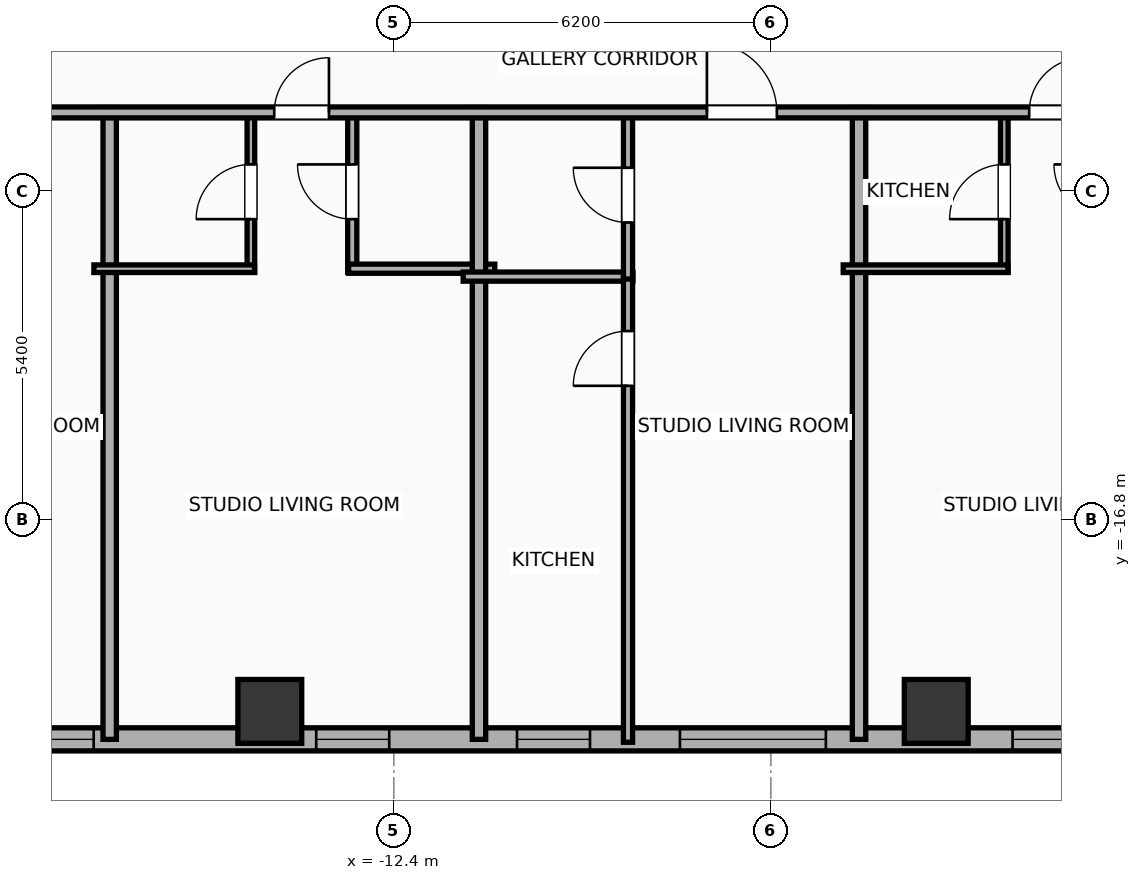
"""IFC4 building model, lengths in metres.
Left out: names, types, materials, properties, quantities, classifications, styles, units other than length and angle.
Written with IfcOpenShell. Run it as: python <this file> out.ifc"""

import sys

from ifc_helpers import new_model, si_unit, direction, frame, frame_2d, origin, origin_2d, place, context, subcontext, project, spatial, rectangle, hollow_rectangle, extrude, element, fill, save


model = new_model("IFC4")
c1 = context("Model", 3, precision=1e-05, world=origin(), true_north=direction((0.0, 1.0)))
c2 = subcontext(c1, "Body", "Model", "MODEL_VIEW")
j1 = project(units=[si_unit("LENGTHUNIT", "METRE"), si_unit("PLANEANGLEUNIT", "RADIAN")], contexts=[c1])
p1 = place(None, origin())
s1 = spatial("IfcSite", under=j1, at=p1, CompositionType="ELEMENT")
p2 = place(p1, origin())
s2 = spatial("IfcBuilding", under=s1, at=p2, CompositionType="ELEMENT")
p3 = place(p2, frame((0.0, 0.0, 124.8)))
s3 = spatial("IfcBuildingStorey", under=s2, at=p3, CompositionType="ELEMENT", Elevation=124.8)
for number, where, z_axis, x_axis in (
    (1, (-14.44, -19.95, 0.0), (0.0, 0.0, 1.0), (1.0, 0.0, 0.0)),
    (2, (-3.48, -19.95, 0.0), (0.0, 0.0, 1.0), (1.0, 0.0, 0.0)),
):
    element("IfcColumn", number, at=place(p3, frame(where, z_axis=z_axis, x_axis=x_axis)), inside=s3, PredefinedType="COLUMN", context=c2, shape_type="SweptSolid", body=[
        extrude(hollow_rectangle(XDim=1.05, YDim=1.05, WallThickness=0.036, at=origin_2d()), origin(), (0.0, 0.0, 1.0), 3.9),
    ])
p4 = place(p3, frame((29.381, -20.41, 0.0), z_axis=(0.0, 0.0, 1.0), x_axis=(-1.0, 0.0, 0.0)))
e3 = element("IfcWall", 3, at=p4, inside=s3, PredefinedType="ELEMENTEDWALL", context=c2, shape_type="SweptSolid", body=[
    extrude(rectangle(XDim=54.763, YDim=0.38, at=frame_2d((27.381, 0.0))), origin(), (0.0, 0.0, 1.0), 3.65),
])
p5 = place(p4, frame((5.645, 0.0, 0.75)))
e4 = element("IfcOpeningElement", 4, at=p5, cuts=e3, PredefinedType="OPENING", context=c2, shape_type="SweptSolid", body=[
    extrude(rectangle(XDim=2.4, YDim=2.1, at=frame_2d((1.2, 1.05))), frame((0.0, 0.2, 0.0), z_axis=(0.0, -1.0, 0.0), x_axis=(1.0, 0.0, 0.0)), (0.0, 0.0, 1.0), 0.4),
])
p6 = place(p4, frame((18.486, 0.0, 0.75)))
e5 = element("IfcOpeningElement", 5, at=p6, cuts=e3, PredefinedType="OPENING", context=c2, shape_type="SweptSolid", body=[
    extrude(rectangle(XDim=2.4, YDim=2.1, at=frame_2d((1.2, 1.05))), frame((0.0, 0.2, 0.0), z_axis=(0.0, -1.0, 0.0), x_axis=(1.0, 0.0, 0.0)), (0.0, 0.0, 1.0), 0.4),
])
p7 = place(p4, frame((34.677, 0.0, 0.75)))
e6 = element("IfcOpeningElement", 6, at=p7, cuts=e3, PredefinedType="OPENING", context=c2, shape_type="SweptSolid", body=[
    extrude(rectangle(XDim=2.4, YDim=2.1, at=frame_2d((1.2, 1.05))), frame((0.0, 0.2, 0.0), z_axis=(0.0, -1.0, 0.0), x_axis=(1.0, 0.0, 0.0)), (0.0, 0.0, 1.0), 0.4),
])
p8 = place(p4, frame((46.717, 0.0, 0.75)))
e7 = element("IfcOpeningElement", 7, at=p8, cuts=e3, PredefinedType="OPENING", context=c2, shape_type="SweptSolid", body=[
    extrude(rectangle(XDim=2.4, YDim=2.1, at=frame_2d((1.2, 1.05))), frame((0.0, 0.2, 0.0), z_axis=(0.0, -1.0, 0.0), x_axis=(1.0, 0.0, 0.0)), (0.0, 0.0, 1.0), 0.4),
])
p9 = place(p4, frame((52.719, 0.0, 0.75)))
e8 = element("IfcOpeningElement", 8, at=p9, cuts=e3, PredefinedType="OPENING", context=c2, shape_type="SweptSolid", body=[
    extrude(rectangle(XDim=1.2, YDim=2.05, at=frame_2d((0.6, 1.025))), frame((0.0, 0.2, 0.0), z_axis=(0.0, -1.0, 0.0), x_axis=(1.0, 0.0, 0.0)), (0.0, 0.0, 1.0), 0.4),
])
p10 = place(p4, frame((50.786, 0.0, 0.75)))
e9 = element("IfcOpeningElement", 9, at=p10, cuts=e3, PredefinedType="OPENING", context=c2, shape_type="SweptSolid", body=[
    extrude(rectangle(XDim=1.2, YDim=2.05, at=frame_2d((0.6, 1.025))), frame((0.0, 0.2, 0.0), z_axis=(0.0, -1.0, 0.0), x_axis=(1.0, 0.0, 0.0)), (0.0, 0.0, 1.0), 0.4),
])
p11 = place(p4, frame((41.858, 0.0, 0.75)))
e10 = element("IfcOpeningElement", 10, at=p11, cuts=e3, PredefinedType="OPENING", context=c2, shape_type="SweptSolid", body=[
    extrude(rectangle(XDim=1.2, YDim=2.05, at=frame_2d((0.6, 1.025))), frame((0.0, 0.2, 0.0), z_axis=(0.0, -1.0, 0.0), x_axis=(1.0, 0.0, 0.0)), (0.0, 0.0, 1.0), 0.4),
])
p12 = place(p4, frame((38.556, 0.0, 0.75)))
e11 = element("IfcOpeningElement", 11, at=p12, cuts=e3, PredefinedType="OPENING", context=c2, shape_type="SweptSolid", body=[
    extrude(rectangle(XDim=1.2, YDim=2.05, at=frame_2d((0.6, 1.025))), frame((0.0, 0.2, 0.0), z_axis=(0.0, -1.0, 0.0), x_axis=(1.0, 0.0, 0.0)), (0.0, 0.0, 1.0), 0.4),
])
p13 = place(p4, frame((30.406, 0.0, 0.75)))
e12 = element("IfcOpeningElement", 12, at=p13, cuts=e3, PredefinedType="OPENING", context=c2, shape_type="SweptSolid", body=[
    extrude(rectangle(XDim=1.2, YDim=2.05, at=frame_2d((0.6, 1.025))), frame((0.0, 0.2, 0.0), z_axis=(0.0, -1.0, 0.0), x_axis=(1.0, 0.0, 0.0)), (0.0, 0.0, 1.0), 0.4),
])
p14 = place(p4, frame((25.434, 0.0, 0.75)))
e13 = element("IfcOpeningElement", 13, at=p14, cuts=e3, PredefinedType="OPENING", context=c2, shape_type="SweptSolid", body=[
    extrude(rectangle(XDim=1.2, YDim=2.05, at=frame_2d((0.6, 1.025))), frame((0.0, 0.2, 0.0), z_axis=(0.0, -1.0, 0.0), x_axis=(1.0, 0.0, 0.0)), (0.0, 0.0, 1.0), 0.4),
])
p15 = place(p4, frame((22.669, 0.0, 0.75)))
e14 = element("IfcOpeningElement", 14, at=p15, cuts=e3, PredefinedType="OPENING", context=c2, shape_type="SweptSolid", body=[
    extrude(rectangle(XDim=1.2, YDim=2.05, at=frame_2d((0.6, 1.025))), frame((0.0, 0.2, 0.0), z_axis=(0.0, -1.0, 0.0), x_axis=(1.0, 0.0, 0.0)), (0.0, 0.0, 1.0), 0.4),
])
p16 = place(p4, frame((15.954, 0.0, 0.75)))
e15 = element("IfcOpeningElement", 15, at=p16, cuts=e3, PredefinedType="OPENING", context=c2, shape_type="SweptSolid", body=[
    extrude(rectangle(XDim=1.2, YDim=2.05, at=frame_2d((0.6, 1.025))), frame((0.0, 0.2, 0.0), z_axis=(0.0, -1.0, 0.0), x_axis=(1.0, 0.0, 0.0)), (0.0, 0.0, 1.0), 0.4),
])
p17 = place(p4, frame((11.698, 0.0, 0.75)))
e16 = element("IfcOpeningElement", 16, at=p17, cuts=e3, PredefinedType="OPENING", context=c2, shape_type="SweptSolid", body=[
    extrude(rectangle(XDim=1.2, YDim=2.05, at=frame_2d((0.6, 1.025))), frame((0.0, 0.2, 0.0), z_axis=(0.0, -1.0, 0.0), x_axis=(1.0, 0.0, 0.0)), (0.0, 0.0, 1.0), 0.4),
])
p18 = place(p4, frame((3.225, 0.0, 0.75)))
e17 = element("IfcOpeningElement", 17, at=p18, cuts=e3, PredefinedType="OPENING", context=c2, shape_type="SweptSolid", body=[
    extrude(rectangle(XDim=1.2, YDim=2.05, at=frame_2d((0.6, 1.025))), frame((0.0, 0.2, 0.0), z_axis=(0.0, -1.0, 0.0), x_axis=(1.0, 0.0, 0.0)), (0.0, 0.0, 1.0), 0.4),
])
p19 = place(p4, frame((1.13, 0.0, 0.75)))
e18 = element("IfcOpeningElement", 18, at=p19, cuts=e3, PredefinedType="OPENING", context=c2, shape_type="SweptSolid", body=[
    extrude(rectangle(XDim=1.2, YDim=2.05, at=frame_2d((0.6, 1.025))), frame((0.0, 0.2, 0.0), z_axis=(0.0, -1.0, 0.0), x_axis=(1.0, 0.0, 0.0)), (0.0, 0.0, 1.0), 0.4),
])
p20 = place(p3, frame((-17.073, -20.41, 0.0), z_axis=(0.0, 0.0, 1.0), x_axis=(0.0, 1.0, 0.0)))
e19 = element("IfcWall", 19, at=p20, inside=s3, PredefinedType="PARTITIONING", context=c2, shape_type="SweptSolid", body=[
    extrude(rectangle(XDim=10.39, YDim=0.22, at=frame_2d((5.195, 0.0))), origin(), (0.0, 0.0, 1.0), 3.65),
])
p21 = place(p3, frame((-14.751, -12.73, 0.0), z_axis=(0.0, 0.0, 1.0), x_axis=(0.0, 1.0, 0.0)))
e20 = element("IfcWall", 20, at=p21, inside=s3, PredefinedType="PARTITIONING", context=c2, shape_type="SweptSolid", body=[
    extrude(rectangle(XDim=2.65, YDim=0.125, at=frame_2d((1.325, 0.0))), origin(), (0.0, 0.0, 1.0), 3.65),
])
p22 = place(p21, frame((0.875, 0.0, 0.0)))
e21 = element("IfcOpeningElement", 21, at=p22, cuts=e20, PredefinedType="OPENING", context=c2, shape_type="SweptSolid", body=[
    extrude(rectangle(XDim=0.9, YDim=2.05, at=frame_2d((0.45, 1.025))), frame((0.0, 0.073, 0.0), z_axis=(0.0, -1.0, 0.0), x_axis=(1.0, 0.0, 0.0)), (0.0, 0.0, 1.0), 0.145),
])
p23 = place(p3, frame((-13.084, -12.73, 0.0), z_axis=(0.0, 0.0, 1.0), x_axis=(0.0, 1.0, 0.0)))
e22 = element("IfcWall", 22, at=p23, inside=s3, PredefinedType="PLUMBINGWALL", context=c2, shape_type="SweptSolid", body=[
    extrude(rectangle(XDim=2.65, YDim=0.15, at=frame_2d((1.325, 0.0))), origin(), (0.0, 0.0, 1.0), 3.65),
])
p24 = place(p23, frame((0.875, 0.0, 0.0)))
e23 = element("IfcOpeningElement", 23, at=p24, cuts=e22, PredefinedType="OPENING", context=c2, shape_type="SweptSolid", body=[
    extrude(rectangle(XDim=0.9, YDim=2.05, at=frame_2d((0.45, 1.025))), frame((0.0, 0.085, 0.0), z_axis=(0.0, -1.0, 0.0), x_axis=(1.0, 0.0, 0.0)), (0.0, 0.0, 1.0), 0.17),
])
p25 = place(p3, frame((-17.333, -12.67, 0.0), z_axis=(0.0, 0.0, 1.0), x_axis=(1.0, 0.0, 0.0)))
e24 = element("IfcWall", 24, at=p25, inside=s3, PredefinedType="PARTITIONING", context=c2, shape_type="SweptSolid", body=[
    extrude(rectangle(XDim=2.642, YDim=0.125, at=frame_2d((1.321, 0.0))), origin(), (0.0, 0.0, 1.0), 3.65),
])
p26 = place(p3, frame((-13.144, -12.67, 0.0), z_axis=(0.0, 0.0, 1.0), x_axis=(1.0, 0.0, 0.0)))
e25 = element("IfcWall", 25, at=p26, inside=s3, PredefinedType="PLUMBINGWALL", context=c2, shape_type="SweptSolid", body=[
    extrude(rectangle(XDim=2.404, YDim=0.15, at=frame_2d((1.202, 0.0))), origin(), (0.0, 0.0, 1.0), 3.65),
])
p27 = place(p3, frame((-11.0, -20.41, 0.0), z_axis=(0.0, 0.0, 1.0), x_axis=(0.0, 1.0, 0.0)))
e26 = element("IfcWall", 26, at=p27, inside=s3, PredefinedType="PARTITIONING", context=c2, shape_type="SweptSolid", body=[
    extrude(rectangle(XDim=10.39, YDim=0.22, at=frame_2d((5.195, 0.0))), origin(), (0.0, 0.0, 1.0), 3.65),
])
p28 = place(p3, frame((-11.26, -12.8, 0.0), z_axis=(0.0, 0.0, 1.0), x_axis=(1.0, 0.0, 0.0)))
e27 = element("IfcWall", 27, at=p28, inside=s3, PredefinedType="PLUMBINGWALL", context=c2, shape_type="SweptSolid", body=[
    extrude(rectangle(XDim=2.791, YDim=0.15, at=frame_2d((1.396, 0.0))), origin(), (0.0, 0.0, 1.0), 3.65),
])
p29 = place(p3, frame((-8.549, -20.458, 0.0), z_axis=(0.0, 0.0, 1.0), x_axis=(0.0, 1.0, 0.0)))
e28 = element("IfcWall", 28, at=p29, inside=s3, PredefinedType="PLUMBINGWALL", context=c2, shape_type="SweptSolid", body=[
    extrude(rectangle(XDim=7.698, YDim=0.15, at=frame_2d((3.849, 0.0))), origin(), (0.0, 0.0, 1.0), 3.65),
])
p30 = place(p29, frame((5.862, 0.0, 0.0)))
e29 = element("IfcOpeningElement", 29, at=p30, cuts=e28, PredefinedType="OPENING", context=c2, shape_type="SweptSolid", body=[
    extrude(rectangle(XDim=0.9, YDim=2.05, at=frame_2d((0.45, 1.025))), frame((0.0, 0.085, 0.0), z_axis=(0.0, -1.0, 0.0), x_axis=(1.0, 0.0, 0.0)), (0.0, 0.0, 1.0), 0.17),
])
p31 = place(p3, frame((-8.549, -12.84, 0.0), z_axis=(0.0, 0.0, 1.0), x_axis=(0.0, 1.0, 0.0)))
e30 = element("IfcWall", 30, at=p31, inside=s3, PredefinedType="PLUMBINGWALL", context=c2, shape_type="SweptSolid", body=[
    extrude(rectangle(XDim=2.76, YDim=0.15, at=frame_2d((1.38, 0.0))), origin(), (0.0, 0.0, 1.0), 3.65),
])
p32 = place(p31, frame((0.93, 0.0, 0.0)))
e31 = element("IfcOpeningElement", 31, at=p32, cuts=e30, PredefinedType="OPENING", context=c2, shape_type="SweptSolid", body=[
    extrude(rectangle(XDim=0.9, YDim=2.05, at=frame_2d((0.45, 1.025))), frame((0.0, 0.085, 0.0), z_axis=(0.0, -1.0, 0.0), x_axis=(1.0, 0.0, 0.0)), (0.0, 0.0, 1.0), 0.17),
])
p33 = place(p3, frame((-4.75, -20.41, 0.0), z_axis=(0.0, 0.0, 1.0), x_axis=(0.0, 1.0, 0.0)))
e32 = element("IfcWall", 32, at=p33, inside=s3, PredefinedType="PARTITIONING", context=c2, shape_type="SweptSolid", body=[
    extrude(rectangle(XDim=10.39, YDim=0.22, at=frame_2d((5.195, 0.0))), origin(), (0.0, 0.0, 1.0), 3.65),
])
p34 = place(p3, frame((-2.361, -12.73, 0.0), z_axis=(0.0, 0.0, 1.0), x_axis=(0.0, 1.0, 0.0)))
e33 = element("IfcWall", 33, at=p34, inside=s3, PredefinedType="PARTITIONING", context=c2, shape_type="SweptSolid", body=[
    extrude(rectangle(XDim=2.65, YDim=0.125, at=frame_2d((1.325, 0.0))), origin(), (0.0, 0.0, 1.0), 3.65),
])
p35 = place(p34, frame((0.875, 0.0, 0.0)))
e34 = element("IfcOpeningElement", 34, at=p35, cuts=e33, PredefinedType="OPENING", context=c2, shape_type="SweptSolid", body=[
    extrude(rectangle(XDim=0.9, YDim=2.05, at=frame_2d((0.45, 1.025))), frame((0.0, 0.073, 0.0), z_axis=(0.0, -1.0, 0.0), x_axis=(1.0, 0.0, 0.0)), (0.0, 0.0, 1.0), 0.145),
])
p36 = place(p3, frame((-5.01, -12.67, 0.0), z_axis=(0.0, 0.0, 1.0), x_axis=(1.0, 0.0, 0.0)))
e35 = element("IfcWall", 35, at=p36, inside=s3, PredefinedType="PARTITIONING", context=c2, shape_type="SweptSolid", body=[
    extrude(rectangle(XDim=2.709, YDim=0.125, at=frame_2d((1.354, 0.0))), origin(), (0.0, 0.0, 1.0), 3.65),
])
p37 = place(p3, frame((-29.21, -10.1, 0.0), z_axis=(0.0, 0.0, 1.0), x_axis=(1.0, 0.0, 0.0)))
e36 = element("IfcWall", 36, at=p37, inside=s3, PredefinedType="PARTITIONING", context=c2, shape_type="SweptSolid", body=[
    extrude(rectangle(XDim=62.42, YDim=0.18, at=frame_2d((31.21, 0.0))), origin(), (0.0, 0.0, 1.0), 3.65),
])
p38 = place(p37, frame((2.671, 0.0, 0.0)))
e37 = element("IfcOpeningElement", 37, at=p38, cuts=e36, PredefinedType="OPENING", context=c2, shape_type="SweptSolid", body=[
    extrude(rectangle(XDim=0.9, YDim=2.05, at=frame_2d((0.45, 1.025))), frame((0.0, 0.1, 0.0), z_axis=(0.0, -1.0, 0.0), x_axis=(1.0, 0.0, 0.0)), (0.0, 0.0, 1.0), 0.2),
])
p39 = place(p37, frame((9.637, 0.0, 0.0)))
e38 = element("IfcOpeningElement", 38, at=p39, cuts=e36, PredefinedType="OPENING", context=c2, shape_type="SweptSolid", body=[
    extrude(rectangle(XDim=1.15, YDim=2.05, at=frame_2d((0.575, 1.025))), frame((0.0, 0.1, 0.0), z_axis=(0.0, -1.0, 0.0), x_axis=(1.0, 0.0, 0.0)), (0.0, 0.0, 1.0), 0.2),
])
p40 = place(p37, frame((14.843, 0.0, 0.0)))
e39 = element("IfcOpeningElement", 39, at=p40, cuts=e36, PredefinedType="OPENING", context=c2, shape_type="SweptSolid", body=[
    extrude(rectangle(XDim=0.9, YDim=2.05, at=frame_2d((0.45, 1.025))), frame((0.0, 0.1, 0.0), z_axis=(0.0, -1.0, 0.0), x_axis=(1.0, 0.0, 0.0)), (0.0, 0.0, 1.0), 0.2),
])
p41 = place(p37, frame((21.958, 0.0, 0.0)))
e40 = element("IfcOpeningElement", 40, at=p41, cuts=e36, PredefinedType="OPENING", context=c2, shape_type="SweptSolid", body=[
    extrude(rectangle(XDim=1.15, YDim=2.05, at=frame_2d((0.575, 1.025))), frame((0.0, 0.1, 0.0), z_axis=(0.0, -1.0, 0.0), x_axis=(1.0, 0.0, 0.0)), (0.0, 0.0, 1.0), 0.2),
])
p42 = place(p37, frame((27.258, 0.0, 0.0)))
e41 = element("IfcOpeningElement", 41, at=p42, cuts=e36, PredefinedType="OPENING", context=c2, shape_type="SweptSolid", body=[
    extrude(rectangle(XDim=0.9, YDim=2.05, at=frame_2d((0.45, 1.025))), frame((0.0, 0.1, 0.0), z_axis=(0.0, -1.0, 0.0), x_axis=(1.0, 0.0, 0.0)), (0.0, 0.0, 1.0), 0.2),
])
p43 = place(p37, frame((32.014, 0.0, 0.0)))
e42 = element("IfcOpeningElement", 42, at=p43, cuts=e36, PredefinedType="OPENING", context=c2, shape_type="SweptSolid", body=[
    extrude(rectangle(XDim=1.15, YDim=2.05, at=frame_2d((0.575, 1.025))), frame((0.0, 0.1, 0.0), z_axis=(0.0, -1.0, 0.0), x_axis=(1.0, 0.0, 0.0)), (0.0, 0.0, 1.0), 0.2),
])
p44 = place(p37, frame((38.369, 0.0, 0.0)))
e43 = element("IfcOpeningElement", 43, at=p44, cuts=e36, PredefinedType="OPENING", context=c2, shape_type="SweptSolid", body=[
    extrude(rectangle(XDim=1.15, YDim=2.05, at=frame_2d((0.575, 1.025))), frame((0.0, 0.1, 0.0), z_axis=(0.0, -1.0, 0.0), x_axis=(1.0, 0.0, 0.0)), (0.0, 0.0, 1.0), 0.2),
])
p45 = place(p37, frame((46.09, 0.0, 0.0)))
e44 = element("IfcOpeningElement", 44, at=p45, cuts=e36, PredefinedType="OPENING", context=c2, shape_type="SweptSolid", body=[
    extrude(rectangle(XDim=0.9, YDim=2.05, at=frame_2d((0.45, 1.025))), frame((0.0, 0.1, 0.0), z_axis=(0.0, -1.0, 0.0), x_axis=(1.0, 0.0, 0.0)), (0.0, 0.0, 1.0), 0.2),
])
p46 = place(p37, frame((51.015, 0.0, 0.0)))
e45 = element("IfcOpeningElement", 45, at=p46, cuts=e36, PredefinedType="OPENING", context=c2, shape_type="SweptSolid", body=[
    extrude(rectangle(XDim=1.15, YDim=2.05, at=frame_2d((0.575, 1.025))), frame((0.0, 0.1, 0.0), z_axis=(0.0, -1.0, 0.0), x_axis=(1.0, 0.0, 0.0)), (0.0, 0.0, 1.0), 0.2),
])
p47 = place(p37, frame((58.93, 0.0, 0.0)))
e46 = element("IfcOpeningElement", 46, at=p47, cuts=e36, PredefinedType="OPENING", context=c2, shape_type="SweptSolid", body=[
    extrude(rectangle(XDim=0.9, YDim=2.05, at=frame_2d((0.45, 1.025))), frame((0.0, 0.1, 0.0), z_axis=(0.0, -1.0, 0.0), x_axis=(1.0, 0.0, 0.0)), (0.0, 0.0, 1.0), 0.2),
])
p48 = place(p7, origin())
e47 = element("IfcWindow", 47, at=p48, inside=s3, PartitioningType="SINGLE_PANEL", PredefinedType="WINDOW", context=c2, shape_type="SweptSolid", body=[
    extrude(rectangle(XDim=2.4, YDim=2.1, at=frame_2d((1.2, 1.05))), frame((0.0, 0.03, 0.0), z_axis=(0.0, -1.0, 0.0), x_axis=(1.0, 0.0, 0.0)), (0.0, 0.0, 1.0), 0.06),
])
fill(e6, e47)
p49 = place(p8, origin())
e48 = element("IfcWindow", 48, at=p49, inside=s3, PartitioningType="SINGLE_PANEL", PredefinedType="WINDOW", context=c2, shape_type="SweptSolid", body=[
    extrude(rectangle(XDim=2.4, YDim=2.1, at=frame_2d((1.2, 1.05))), frame((0.0, 0.03, 0.0), z_axis=(0.0, -1.0, 0.0), x_axis=(1.0, 0.0, 0.0)), (0.0, 0.0, 1.0), 0.06),
])
fill(e7, e48)
p50 = place(p11, origin())
e49 = element("IfcWindow", 49, at=p50, inside=s3, PartitioningType="SINGLE_PANEL", PredefinedType="WINDOW", context=c2, shape_type="SweptSolid", body=[
    extrude(rectangle(XDim=1.2, YDim=2.05, at=frame_2d((0.6, 1.025))), frame((0.0, 0.03, 0.0), z_axis=(0.0, -1.0, 0.0), x_axis=(1.0, 0.0, 0.0)), (0.0, 0.0, 1.0), 0.06),
])
fill(e10, e49)
p51 = place(p12, origin())
e50 = element("IfcWindow", 50, at=p51, inside=s3, PartitioningType="SINGLE_PANEL", PredefinedType="WINDOW", context=c2, shape_type="SweptSolid", body=[
    extrude(rectangle(XDim=1.2, YDim=2.05, at=frame_2d((0.6, 1.025))), frame((0.0, 0.03, 0.0), z_axis=(0.0, -1.0, 0.0), x_axis=(1.0, 0.0, 0.0)), (0.0, 0.0, 1.0), 0.06),
])
fill(e11, e50)
p52 = place(p13, origin())
e51 = element("IfcWindow", 51, at=p52, inside=s3, PartitioningType="SINGLE_PANEL", PredefinedType="WINDOW", context=c2, shape_type="SweptSolid", body=[
    extrude(rectangle(XDim=1.2, YDim=2.05, at=frame_2d((0.6, 1.025))), frame((0.0, 0.03, 0.0), z_axis=(0.0, -1.0, 0.0), x_axis=(1.0, 0.0, 0.0)), (0.0, 0.0, 1.0), 0.06),
])
fill(e12, e51)
p53 = place(p22, origin())
e52 = element("IfcDoor", 52, at=p53, inside=s3, OperationType="SINGLE_SWING_LEFT", PredefinedType="DOOR", context=c2, shape_type="SweptSolid", body=[
    extrude(rectangle(XDim=0.9, YDim=2.05, at=frame_2d((0.45, 1.025))), frame((0.0, 0.025, 0.0), z_axis=(0.0, -1.0, 0.0), x_axis=(1.0, 0.0, 0.0)), (0.0, 0.0, 1.0), 0.05),
])
fill(e21, e52)
p54 = place(p24, origin())
e53 = element("IfcDoor", 53, at=p54, inside=s3, OperationType="SINGLE_SWING_RIGHT", PredefinedType="DOOR", context=c2, shape_type="SweptSolid", body=[
    extrude(rectangle(XDim=0.9, YDim=2.05, at=frame_2d((0.45, 1.025))), frame((0.0, 0.025, 0.0), z_axis=(0.0, -1.0, 0.0), x_axis=(1.0, 0.0, 0.0)), (0.0, 0.0, 1.0), 0.05),
])
fill(e23, e53)
p55 = place(p30, origin())
e54 = element("IfcDoor", 54, at=p55, inside=s3, OperationType="SINGLE_SWING_LEFT", PredefinedType="DOOR", context=c2, shape_type="SweptSolid", body=[
    extrude(rectangle(XDim=0.9, YDim=2.05, at=frame_2d((0.45, 1.025))), frame((0.0, 0.025, 0.0), z_axis=(0.0, -1.0, 0.0), x_axis=(1.0, 0.0, 0.0)), (0.0, 0.0, 1.0), 0.05),
])
fill(e29, e54)
p56 = place(p32, origin())
e55 = element("IfcDoor", 55, at=p56, inside=s3, OperationType="SINGLE_SWING_RIGHT", PredefinedType="DOOR", context=c2, shape_type="SweptSolid", body=[
    extrude(rectangle(XDim=0.9, YDim=2.05, at=frame_2d((0.45, 1.025))), frame((0.0, 0.025, 0.0), z_axis=(0.0, -1.0, 0.0), x_axis=(1.0, 0.0, 0.0)), (0.0, 0.0, 1.0), 0.05),
])
fill(e31, e55)
p57 = place(p35, origin())
e56 = element("IfcDoor", 56, at=p57, inside=s3, OperationType="SINGLE_SWING_LEFT", PredefinedType="DOOR", context=c2, shape_type="SweptSolid", body=[
    extrude(rectangle(XDim=0.9, YDim=2.05, at=frame_2d((0.45, 1.025))), frame((0.0, 0.025, 0.0), z_axis=(0.0, -1.0, 0.0), x_axis=(1.0, 0.0, 0.0)), (0.0, 0.0, 1.0), 0.05),
])
fill(e34, e56)
p58 = place(p40, origin())
e57 = element("IfcDoor", 57, at=p58, inside=s3, OperationType="SINGLE_SWING_RIGHT", PredefinedType="DOOR", context=c2, shape_type="SweptSolid", body=[
    extrude(rectangle(XDim=0.9, YDim=2.05, at=frame_2d((0.45, 1.025))), frame((0.0, 0.025, 0.0), z_axis=(0.0, -1.0, 0.0), x_axis=(1.0, 0.0, 0.0)), (0.0, 0.0, 1.0), 0.05),
])
fill(e39, e57)
p59 = place(p41, origin())
e58 = element("IfcDoor", 58, at=p59, inside=s3, OperationType="SINGLE_SWING_LEFT", PredefinedType="DOOR", context=c2, shape_type="SweptSolid", body=[
    extrude(rectangle(XDim=1.15, YDim=2.05, at=frame_2d((0.575, 1.025))), frame((0.0, 0.025, 0.0), z_axis=(0.0, -1.0, 0.0), x_axis=(1.0, 0.0, 0.0)), (0.0, 0.0, 1.0), 0.05),
])
fill(e40, e58)
p60 = place(p42, origin())
e59 = element("IfcDoor", 59, at=p60, inside=s3, OperationType="SINGLE_SWING_RIGHT", PredefinedType="DOOR", context=c2, shape_type="SweptSolid", body=[
    extrude(rectangle(XDim=0.9, YDim=2.05, at=frame_2d((0.45, 1.025))), frame((0.0, 0.025, 0.0), z_axis=(0.0, -1.0, 0.0), x_axis=(1.0, 0.0, 0.0)), (0.0, 0.0, 1.0), 0.05),
])
fill(e41, e59)
save(model, sys.argv[1])
